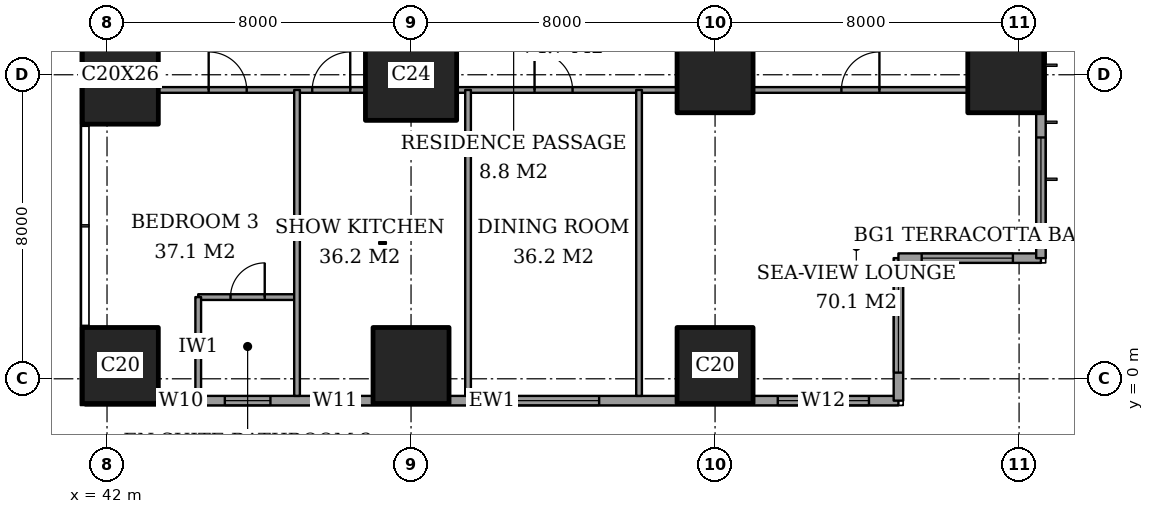
"""IFC4 building model, lengths in metres.
Left out: names, types, materials, properties, quantities, classifications, styles, units other than length and angle.
Written with IfcOpenShell. Run it as: python <this file> out.ifc"""

import sys

from ifc_helpers import new_model, si_unit, direction, frame, frame_2d, origin, origin_2d, place, context, subcontext, project, spatial, rectangle, extrude, element, fill, save


model = new_model("IFC4")
c1 = context("Model", 3, precision=1e-05, world=origin(), true_north=direction((0.0, 1.0)))
c2 = subcontext(c1, "Body", "Model", "MODEL_VIEW")
j1 = project(units=[si_unit("LENGTHUNIT", "METRE"), si_unit("PLANEANGLEUNIT", "RADIAN")], contexts=[c1])
p1 = place(None, origin())
s1 = spatial("IfcSite", under=j1, at=p1, CompositionType="ELEMENT")
p2 = place(p1, origin())
s2 = spatial("IfcBuilding", under=s1, at=p2, CompositionType="ELEMENT")
p3 = place(p2, frame((0.0, 0.0, 96.2)))
s3 = spatial("IfcBuildingStorey", under=s2, at=p3, CompositionType="ELEMENT", Elevation=96.2)
p4 = place(p3, frame((42.35, 0.35, 0.0), z_axis=(0.0, 0.0, 1.0), x_axis=(1.0, 0.0, 0.0)))
e1 = element("IfcColumn", 1, at=p4, inside=s3, PredefinedType="COLUMN", context=c2, shape_type="SweptSolid", body=[
    extrude(rectangle(XDim=2.0, YDim=2.0, at=origin_2d()), origin(), (0.0, 0.0, 1.0), 3.6),
])
p5 = place(p3, frame((42.35, 8.0, 0.0), z_axis=(0.0, 0.0, 1.0), x_axis=(1.0, 0.0, 0.0)))
e2 = element("IfcColumn", 2, at=p5, inside=s3, PredefinedType="COLUMN", context=c2, shape_type="SweptSolid", body=[
    extrude(rectangle(XDim=2.0, YDim=2.6, at=origin_2d()), origin(), (0.0, 0.0, 1.0), 3.6),
])
p6 = place(p3, frame((50.0, 0.35, 0.0), z_axis=(0.0, 0.0, 1.0), x_axis=(1.0, 0.0, 0.0)))
e3 = element("IfcColumn", 3, at=p6, inside=s3, PredefinedType="COLUMN", context=c2, shape_type="SweptSolid", body=[
    extrude(rectangle(XDim=2.0, YDim=2.0, at=origin_2d()), origin(), (0.0, 0.0, 1.0), 3.6),
])
p7 = place(p3, frame((50.0, 8.0, 0.0), z_axis=(0.0, 0.0, 1.0), x_axis=(1.0, 0.0, 0.0)))
e4 = element("IfcColumn", 4, at=p7, inside=s3, PredefinedType="COLUMN", context=c2, shape_type="SweptSolid", body=[
    extrude(rectangle(XDim=2.4, YDim=2.4, at=origin_2d()), origin(), (0.0, 0.0, 1.0), 3.6),
])
for number, where, z_axis, x_axis in (
    (5, (58.0, 0.35, 0.0), (0.0, 0.0, 1.0), (1.0, 0.0, 0.0)),
    (6, (58.0, 8.0, 0.0), (0.0, 0.0, 1.0), (1.0, 0.0, 0.0)),
    (7, (65.65, 8.0, 0.0), (0.0, 0.0, 1.0), (1.0, 0.0, 0.0)),
):
    element("IfcColumn", number, at=place(p3, frame(where, z_axis=z_axis, x_axis=x_axis)), inside=s3, PredefinedType="COLUMN", context=c2, shape_type="SweptSolid", body=[
        extrude(rectangle(XDim=2.0, YDim=2.0, at=origin_2d()), origin(), (0.0, 0.0, 1.0), 3.6),
    ])
p8 = place(p3, frame((41.425, -0.575, 0.0), z_axis=(0.0, 0.0, 1.0), x_axis=(1.0, 0.0, 0.0)))
e8 = element("IfcWall", 8, at=p8, inside=s3, PredefinedType="SOLIDWALL", context=c2, shape_type="SweptSolid", body=[
    extrude(rectangle(XDim=21.4, YDim=0.25, at=frame_2d((10.7, 0.0))), origin(), (0.0, 0.0, 1.0), 3.6),
])
p9 = place(p8, frame((2.225, 0.0, 0.4)))
e9 = element("IfcOpeningElement", 9, at=p9, cuts=e8, PredefinedType="OPENING", context=c2, shape_type="SweptSolid", body=[
    extrude(rectangle(XDim=0.6, YDim=2.2, at=frame_2d((0.3, 1.1))), frame((0.0, 0.135, 0.0), z_axis=(0.0, -1.0, 0.0), x_axis=(1.0, 0.0, 0.0)), (0.0, 0.0, 1.0), 0.27),
])
p10 = place(p8, frame((3.675, 0.0, 0.4)))
e10 = element("IfcOpeningElement", 10, at=p10, cuts=e8, PredefinedType="OPENING", context=c2, shape_type="SweptSolid", body=[
    extrude(rectangle(XDim=1.2, YDim=2.2, at=frame_2d((0.6, 1.1))), frame((0.0, 0.135, 0.0), z_axis=(0.0, -1.0, 0.0), x_axis=(1.0, 0.0, 0.0)), (0.0, 0.0, 1.0), 0.27),
])
p11 = place(p8, frame((5.975, 0.0, 0.4)))
e11 = element("IfcOpeningElement", 11, at=p11, cuts=e8, PredefinedType="OPENING", context=c2, shape_type="SweptSolid", body=[
    extrude(rectangle(XDim=1.2, YDim=2.2, at=frame_2d((0.6, 1.1))), frame((0.0, 0.135, 0.0), z_axis=(0.0, -1.0, 0.0), x_axis=(1.0, 0.0, 0.0)), (0.0, 0.0, 1.0), 0.27),
])
p12 = place(p8, frame((11.125, 0.0, 0.4)))
e12 = element("IfcOpeningElement", 12, at=p12, cuts=e8, PredefinedType="OPENING", context=c2, shape_type="SweptSolid", body=[
    extrude(rectangle(XDim=2.4, YDim=2.2, at=frame_2d((1.2, 1.1))), frame((0.0, 0.135, 0.0), z_axis=(0.0, -1.0, 0.0), x_axis=(1.0, 0.0, 0.0)), (0.0, 0.0, 1.0), 0.27),
])
p13 = place(p8, frame((18.225, 0.0, 0.4)))
e13 = element("IfcOpeningElement", 13, at=p13, cuts=e8, PredefinedType="OPENING", context=c2, shape_type="SweptSolid", body=[
    extrude(rectangle(XDim=2.4, YDim=2.2, at=frame_2d((1.2, 1.1))), frame((0.0, 0.135, 0.0), z_axis=(0.0, -1.0, 0.0), x_axis=(1.0, 0.0, 0.0)), (0.0, 0.0, 1.0), 0.27),
])
p14 = place(p3, frame((62.825, -0.575, 0.0), z_axis=(0.0, 0.0, 1.0), x_axis=(0.0, 1.0, 0.0)))
e14 = element("IfcWall", 14, at=p14, inside=s3, PredefinedType="SOLIDWALL", context=c2, shape_type="SweptSolid", body=[
    extrude(rectangle(XDim=3.75, YDim=0.25, at=frame_2d((1.875, 0.0))), origin(), (0.0, 0.0, 1.0), 3.6),
])
p15 = place(p14, frame((0.738, 0.0, 0.4)))
e15 = element("IfcOpeningElement", 15, at=p15, cuts=e14, PredefinedType="OPENING", context=c2, shape_type="SweptSolid", body=[
    extrude(rectangle(XDim=2.4, YDim=2.2, at=frame_2d((1.2, 1.1))), frame((0.0, 0.135, 0.0), z_axis=(0.0, -1.0, 0.0), x_axis=(1.0, 0.0, 0.0)), (0.0, 0.0, 1.0), 0.27),
])
p16 = place(p3, frame((62.825, 3.175, 0.0), z_axis=(0.0, 0.0, 1.0), x_axis=(1.0, 0.0, 0.0)))
e16 = element("IfcWall", 16, at=p16, inside=s3, PredefinedType="SOLIDWALL", context=c2, shape_type="SweptSolid", body=[
    extrude(rectangle(XDim=3.75, YDim=0.25, at=frame_2d((1.875, 0.0))), origin(), (0.0, 0.0, 1.0), 3.6),
])
p17 = place(p16, frame((0.613, 0.0, 0.4)))
e17 = element("IfcOpeningElement", 17, at=p17, cuts=e16, PredefinedType="OPENING", context=c2, shape_type="SweptSolid", body=[
    extrude(rectangle(XDim=2.4, YDim=2.2, at=frame_2d((1.2, 1.1))), frame((0.0, 0.135, 0.0), z_axis=(0.0, -1.0, 0.0), x_axis=(1.0, 0.0, 0.0)), (0.0, 0.0, 1.0), 0.27),
])
p18 = place(p3, frame((66.575, 3.175, 0.0), z_axis=(0.0, 0.0, 1.0), x_axis=(0.0, 1.0, 0.0)))
e18 = element("IfcWall", 18, at=p18, inside=s3, PredefinedType="SOLIDWALL", context=c2, shape_type="SweptSolid", body=[
    extrude(rectangle(XDim=41.65, YDim=0.25, at=frame_2d((20.825, 0.0))), origin(), (0.0, 0.0, 1.0), 3.6),
])
p19 = place(p18, frame((0.775, 0.0, 0.4)))
e19 = element("IfcOpeningElement", 19, at=p19, cuts=e18, PredefinedType="OPENING", context=c2, shape_type="SweptSolid", body=[
    extrude(rectangle(XDim=2.4, YDim=2.2, at=frame_2d((1.2, 1.1))), frame((0.0, 0.135, 0.0), z_axis=(0.0, -1.0, 0.0), x_axis=(1.0, 0.0, 0.0)), (0.0, 0.0, 1.0), 0.27),
])
p20 = place(p18, frame((6.1, 0.0, 0.4)))
e20 = element("IfcOpeningElement", 20, at=p20, cuts=e18, PredefinedType="OPENING", context=c2, shape_type="SweptSolid", body=[
    extrude(rectangle(XDim=1.2, YDim=2.2, at=frame_2d((0.6, 1.1))), frame((0.0, 0.135, 0.0), z_axis=(0.0, -1.0, 0.0), x_axis=(1.0, 0.0, 0.0)), (0.0, 0.0, 1.0), 0.27),
])
p21 = place(p18, frame((8.275, 0.0, 0.4)))
e21 = element("IfcOpeningElement", 21, at=p21, cuts=e18, PredefinedType="OPENING", context=c2, shape_type="SweptSolid", body=[
    extrude(rectangle(XDim=2.4, YDim=2.2, at=frame_2d((1.2, 1.1))), frame((0.0, 0.135, 0.0), z_axis=(0.0, -1.0, 0.0), x_axis=(1.0, 0.0, 0.0)), (0.0, 0.0, 1.0), 0.27),
])
p22 = place(p18, frame((15.775, 0.0, 0.4)))
e22 = element("IfcOpeningElement", 22, at=p22, cuts=e18, PredefinedType="OPENING", context=c2, shape_type="SweptSolid", body=[
    extrude(rectangle(XDim=2.4, YDim=2.2, at=frame_2d((1.2, 1.1))), frame((0.0, 0.135, 0.0), z_axis=(0.0, -1.0, 0.0), x_axis=(1.0, 0.0, 0.0)), (0.0, 0.0, 1.0), 0.27),
])
p23 = place(p18, frame((23.475, 0.0, 0.4)))
e23 = element("IfcOpeningElement", 23, at=p23, cuts=e18, PredefinedType="OPENING", context=c2, shape_type="SweptSolid", body=[
    extrude(rectangle(XDim=2.4, YDim=2.2, at=frame_2d((1.2, 1.1))), frame((0.0, 0.135, 0.0), z_axis=(0.0, -1.0, 0.0), x_axis=(1.0, 0.0, 0.0)), (0.0, 0.0, 1.0), 0.27),
])
p24 = place(p18, frame((30.975, 0.0, 0.4)))
e24 = element("IfcOpeningElement", 24, at=p24, cuts=e18, PredefinedType="OPENING", context=c2, shape_type="SweptSolid", body=[
    extrude(rectangle(XDim=2.4, YDim=2.2, at=frame_2d((1.2, 1.1))), frame((0.0, 0.135, 0.0), z_axis=(0.0, -1.0, 0.0), x_axis=(1.0, 0.0, 0.0)), (0.0, 0.0, 1.0), 0.27),
])
p25 = place(p18, frame((34.5, 0.0, 0.4)))
e25 = element("IfcOpeningElement", 25, at=p25, cuts=e18, PredefinedType="OPENING", context=c2, shape_type="SweptSolid", body=[
    extrude(rectangle(XDim=1.2, YDim=2.2, at=frame_2d((0.6, 1.1))), frame((0.0, 0.135, 0.0), z_axis=(0.0, -1.0, 0.0), x_axis=(1.0, 0.0, 0.0)), (0.0, 0.0, 1.0), 0.27),
])
p26 = place(p18, frame((38.475, 0.0, 0.4)))
e26 = element("IfcOpeningElement", 26, at=p26, cuts=e18, PredefinedType="OPENING", context=c2, shape_type="SweptSolid", body=[
    extrude(rectangle(XDim=2.4, YDim=2.2, at=frame_2d((1.2, 1.1))), frame((0.0, 0.135, 0.0), z_axis=(0.0, -1.0, 0.0), x_axis=(1.0, 0.0, 0.0)), (0.0, 0.0, 1.0), 0.27),
])
p27 = place(p3, frame((44.4, 2.15, 0.0), z_axis=(0.0, 0.0, 1.0), x_axis=(1.0, 0.0, 0.0)))
e27 = element("IfcWall", 27, at=p27, inside=s3, PredefinedType="PARTITIONING", context=c2, shape_type="SweptSolid", body=[
    extrude(rectangle(XDim=2.6, YDim=0.15, at=frame_2d((1.3, 0.0))), origin(), (0.0, 0.0, 1.0), 3.35),
])
p28 = place(p27, frame((0.85, 0.0, 0.0)))
e28 = element("IfcOpeningElement", 28, at=p28, cuts=e27, PredefinedType="OPENING", context=c2, shape_type="SweptSolid", body=[
    extrude(rectangle(XDim=0.9, YDim=2.1, at=frame_2d((0.45, 1.05))), frame((0.0, 0.085, 0.0), z_axis=(0.0, -1.0, 0.0), x_axis=(1.0, 0.0, 0.0)), (0.0, 0.0, 1.0), 0.17),
])
p29 = place(p3, frame((43.35, 7.6, 0.0), z_axis=(0.0, 0.0, 1.0), x_axis=(1.0, 0.0, 0.0)))
e29 = element("IfcWall", 29, at=p29, inside=s3, PredefinedType="PARTITIONING", context=c2, shape_type="SweptSolid", body=[
    extrude(rectangle(XDim=5.45, YDim=0.15, at=frame_2d((2.725, 0.0))), origin(), (0.0, 0.0, 1.0), 3.35),
])
p30 = place(p29, frame((4.05, 0.0, 0.0)))
e30 = element("IfcOpeningElement", 30, at=p30, cuts=e29, PredefinedType="OPENING", context=c2, shape_type="SweptSolid", body=[
    extrude(rectangle(XDim=1.0, YDim=2.1, at=frame_2d((0.5, 1.05))), frame((0.0, 0.085, 0.0), z_axis=(0.0, -1.0, 0.0), x_axis=(1.0, 0.0, 0.0)), (0.0, 0.0, 1.0), 0.17),
])
p31 = place(p29, frame((1.325, 0.0, 0.0)))
e31 = element("IfcOpeningElement", 31, at=p31, cuts=e29, PredefinedType="OPENING", context=c2, shape_type="SweptSolid", body=[
    extrude(rectangle(XDim=1.0, YDim=2.1, at=frame_2d((0.5, 1.05))), frame((0.0, 0.085, 0.0), z_axis=(0.0, -1.0, 0.0), x_axis=(1.0, 0.0, 0.0)), (0.0, 0.0, 1.0), 0.17),
])
p32 = place(p3, frame((51.2, 7.6, 0.0), z_axis=(0.0, 0.0, 1.0), x_axis=(1.0, 0.0, 0.0)))
e32 = element("IfcWall", 32, at=p32, inside=s3, PredefinedType="PARTITIONING", context=c2, shape_type="SweptSolid", body=[
    extrude(rectangle(XDim=5.8, YDim=0.15, at=frame_2d((2.9, 0.0))), origin(), (0.0, 0.0, 1.0), 3.35),
])
p33 = place(p32, frame((2.05, 0.0, 0.0)))
e33 = element("IfcOpeningElement", 33, at=p33, cuts=e32, PredefinedType="OPENING", context=c2, shape_type="SweptSolid", body=[
    extrude(rectangle(XDim=1.0, YDim=2.1, at=frame_2d((0.5, 1.05))), frame((0.0, 0.085, 0.0), z_axis=(0.0, -1.0, 0.0), x_axis=(1.0, 0.0, 0.0)), (0.0, 0.0, 1.0), 0.17),
])
p34 = place(p3, frame((59.0, 7.6, 0.0), z_axis=(0.0, 0.0, 1.0), x_axis=(1.0, 0.0, 0.0)))
e34 = element("IfcWall", 34, at=p34, inside=s3, PredefinedType="PARTITIONING", context=c2, shape_type="SweptSolid", body=[
    extrude(rectangle(XDim=5.65, YDim=0.15, at=frame_2d((2.825, 0.0))), origin(), (0.0, 0.0, 1.0), 3.35),
])
p35 = place(p34, frame((2.325, 0.0, 0.0)))
e35 = element("IfcOpeningElement", 35, at=p35, cuts=e34, PredefinedType="OPENING", context=c2, shape_type="SweptSolid", body=[
    extrude(rectangle(XDim=1.0, YDim=2.1, at=frame_2d((0.5, 1.05))), frame((0.0, 0.085, 0.0), z_axis=(0.0, -1.0, 0.0), x_axis=(1.0, 0.0, 0.0)), (0.0, 0.0, 1.0), 0.17),
])
p36 = place(p3, frame((44.4, -0.45, 0.0), z_axis=(0.0, 0.0, 1.0), x_axis=(0.0, 1.0, 0.0)))
e36 = element("IfcWall", 36, at=p36, inside=s3, PredefinedType="PARTITIONING", context=c2, shape_type="SweptSolid", body=[
    extrude(rectangle(XDim=2.6, YDim=0.15, at=frame_2d((1.3, 0.0))), origin(), (0.0, 0.0, 1.0), 3.35),
])
for number, where, z_axis, x_axis in (
    (37, (47.0, -0.45, 0.0), (0.0, 0.0, 1.0), (0.0, 1.0, 0.0)),
    (38, (51.5, -0.45, 0.0), (0.0, 0.0, 1.0), (0.0, 1.0, 0.0)),
    (39, (56.0, -0.45, 0.0), (0.0, 0.0, 1.0), (0.0, 1.0, 0.0)),
):
    element("IfcWall", number, at=place(p3, frame(where, z_axis=z_axis, x_axis=x_axis)), inside=s3, PredefinedType="PARTITIONING", context=c2, shape_type="SweptSolid", body=[
        extrude(rectangle(XDim=8.05, YDim=0.15, at=frame_2d((4.025, 0.0))), origin(), (0.0, 0.0, 1.0), 3.35),
    ])
p37 = place(p9, origin())
e40 = element("IfcWindow", 40, at=p37, inside=s3, PartitioningType="SINGLE_PANEL", PredefinedType="WINDOW", context=c2, shape_type="SweptSolid", body=[
    extrude(rectangle(XDim=0.6, YDim=2.2, at=frame_2d((0.3, 1.1))), frame((0.0, 0.03, 0.0), z_axis=(0.0, -1.0, 0.0), x_axis=(1.0, 0.0, 0.0)), (0.0, 0.0, 1.0), 0.06),
])
fill(e9, e40)
p38 = place(p10, origin())
e41 = element("IfcWindow", 41, at=p38, inside=s3, PartitioningType="SINGLE_PANEL", PredefinedType="WINDOW", context=c2, shape_type="SweptSolid", body=[
    extrude(rectangle(XDim=1.2, YDim=2.2, at=frame_2d((0.6, 1.1))), frame((0.0, 0.03, 0.0), z_axis=(0.0, -1.0, 0.0), x_axis=(1.0, 0.0, 0.0)), (0.0, 0.0, 1.0), 0.06),
])
fill(e10, e41)
p39 = place(p11, origin())
e42 = element("IfcWindow", 42, at=p39, inside=s3, PartitioningType="SINGLE_PANEL", PredefinedType="WINDOW", context=c2, shape_type="SweptSolid", body=[
    extrude(rectangle(XDim=1.2, YDim=2.2, at=frame_2d((0.6, 1.1))), frame((0.0, 0.03, 0.0), z_axis=(0.0, -1.0, 0.0), x_axis=(1.0, 0.0, 0.0)), (0.0, 0.0, 1.0), 0.06),
])
fill(e11, e42)
p40 = place(p12, origin())
e43 = element("IfcWindow", 43, at=p40, inside=s3, PartitioningType="SINGLE_PANEL", PredefinedType="WINDOW", context=c2, shape_type="SweptSolid", body=[
    extrude(rectangle(XDim=2.4, YDim=2.2, at=frame_2d((1.2, 1.1))), frame((0.0, 0.03, 0.0), z_axis=(0.0, -1.0, 0.0), x_axis=(1.0, 0.0, 0.0)), (0.0, 0.0, 1.0), 0.06),
])
fill(e12, e43)
p41 = place(p13, origin())
e44 = element("IfcWindow", 44, at=p41, inside=s3, PartitioningType="SINGLE_PANEL", PredefinedType="WINDOW", context=c2, shape_type="SweptSolid", body=[
    extrude(rectangle(XDim=2.4, YDim=2.2, at=frame_2d((1.2, 1.1))), frame((0.0, 0.03, 0.0), z_axis=(0.0, -1.0, 0.0), x_axis=(1.0, 0.0, 0.0)), (0.0, 0.0, 1.0), 0.06),
])
fill(e13, e44)
p42 = place(p15, origin())
e45 = element("IfcWindow", 45, at=p42, inside=s3, PartitioningType="SINGLE_PANEL", PredefinedType="WINDOW", context=c2, shape_type="SweptSolid", body=[
    extrude(rectangle(XDim=2.4, YDim=2.2, at=frame_2d((1.2, 1.1))), frame((0.0, 0.03, 0.0), z_axis=(0.0, -1.0, 0.0), x_axis=(1.0, 0.0, 0.0)), (0.0, 0.0, 1.0), 0.06),
])
fill(e15, e45)
p43 = place(p17, origin())
e46 = element("IfcWindow", 46, at=p43, inside=s3, PartitioningType="SINGLE_PANEL", PredefinedType="WINDOW", context=c2, shape_type="SweptSolid", body=[
    extrude(rectangle(XDim=2.4, YDim=2.2, at=frame_2d((1.2, 1.1))), frame((0.0, 0.03, 0.0), z_axis=(0.0, -1.0, 0.0), x_axis=(1.0, 0.0, 0.0)), (0.0, 0.0, 1.0), 0.06),
])
fill(e17, e46)
p44 = place(p19, origin())
e47 = element("IfcWindow", 47, at=p44, inside=s3, PartitioningType="SINGLE_PANEL", PredefinedType="WINDOW", context=c2, shape_type="SweptSolid", body=[
    extrude(rectangle(XDim=2.4, YDim=2.2, at=frame_2d((1.2, 1.1))), frame((0.0, 0.03, 0.0), z_axis=(0.0, -1.0, 0.0), x_axis=(1.0, 0.0, 0.0)), (0.0, 0.0, 1.0), 0.06),
])
fill(e19, e47)
p45 = place(p35, origin())
e48 = element("IfcDoor", 48, at=p45, inside=s3, OperationType="SINGLE_SWING_LEFT", PredefinedType="DOOR", context=c2, shape_type="SweptSolid", body=[
    extrude(rectangle(XDim=1.0, YDim=2.1, at=frame_2d((0.5, 1.05))), frame((0.0, 0.025, 0.0), z_axis=(0.0, -1.0, 0.0), x_axis=(1.0, 0.0, 0.0)), (0.0, 0.0, 1.0), 0.05),
])
fill(e35, e48)
p46 = place(p33, origin())
e49 = element("IfcDoor", 49, at=p46, inside=s3, OperationType="SINGLE_SWING_RIGHT", PredefinedType="DOOR", context=c2, shape_type="SweptSolid", body=[
    extrude(rectangle(XDim=1.0, YDim=2.1, at=frame_2d((0.5, 1.05))), frame((0.0, 0.025, 0.0), z_axis=(0.0, -1.0, 0.0), x_axis=(1.0, 0.0, 0.0)), (0.0, 0.0, 1.0), 0.05),
])
fill(e33, e49)
p47 = place(p30, origin())
e50 = element("IfcDoor", 50, at=p47, inside=s3, OperationType="SINGLE_SWING_LEFT", PredefinedType="DOOR", context=c2, shape_type="SweptSolid", body=[
    extrude(rectangle(XDim=1.0, YDim=2.1, at=frame_2d((0.5, 1.05))), frame((0.0, 0.025, 0.0), z_axis=(0.0, -1.0, 0.0), x_axis=(1.0, 0.0, 0.0)), (0.0, 0.0, 1.0), 0.05),
])
fill(e30, e50)
p48 = place(p28, origin())
e51 = element("IfcDoor", 51, at=p48, inside=s3, OperationType="SINGLE_SWING_LEFT", PredefinedType="DOOR", context=c2, shape_type="SweptSolid", body=[
    extrude(rectangle(XDim=0.9, YDim=2.1, at=frame_2d((0.45, 1.05))), frame((0.0, 0.025, 0.0), z_axis=(0.0, -1.0, 0.0), x_axis=(1.0, 0.0, 0.0)), (0.0, 0.0, 1.0), 0.05),
])
fill(e28, e51)
p49 = place(p31, origin())
e52 = element("IfcDoor", 52, at=p49, inside=s3, OperationType="SINGLE_SWING_RIGHT", PredefinedType="DOOR", context=c2, shape_type="SweptSolid", body=[
    extrude(rectangle(XDim=1.0, YDim=2.1, at=frame_2d((0.5, 1.05))), frame((0.0, 0.025, 0.0), z_axis=(0.0, -1.0, 0.0), x_axis=(1.0, 0.0, 0.0)), (0.0, 0.0, 1.0), 0.05),
])
fill(e31, e52)
save(model, sys.argv[1])
